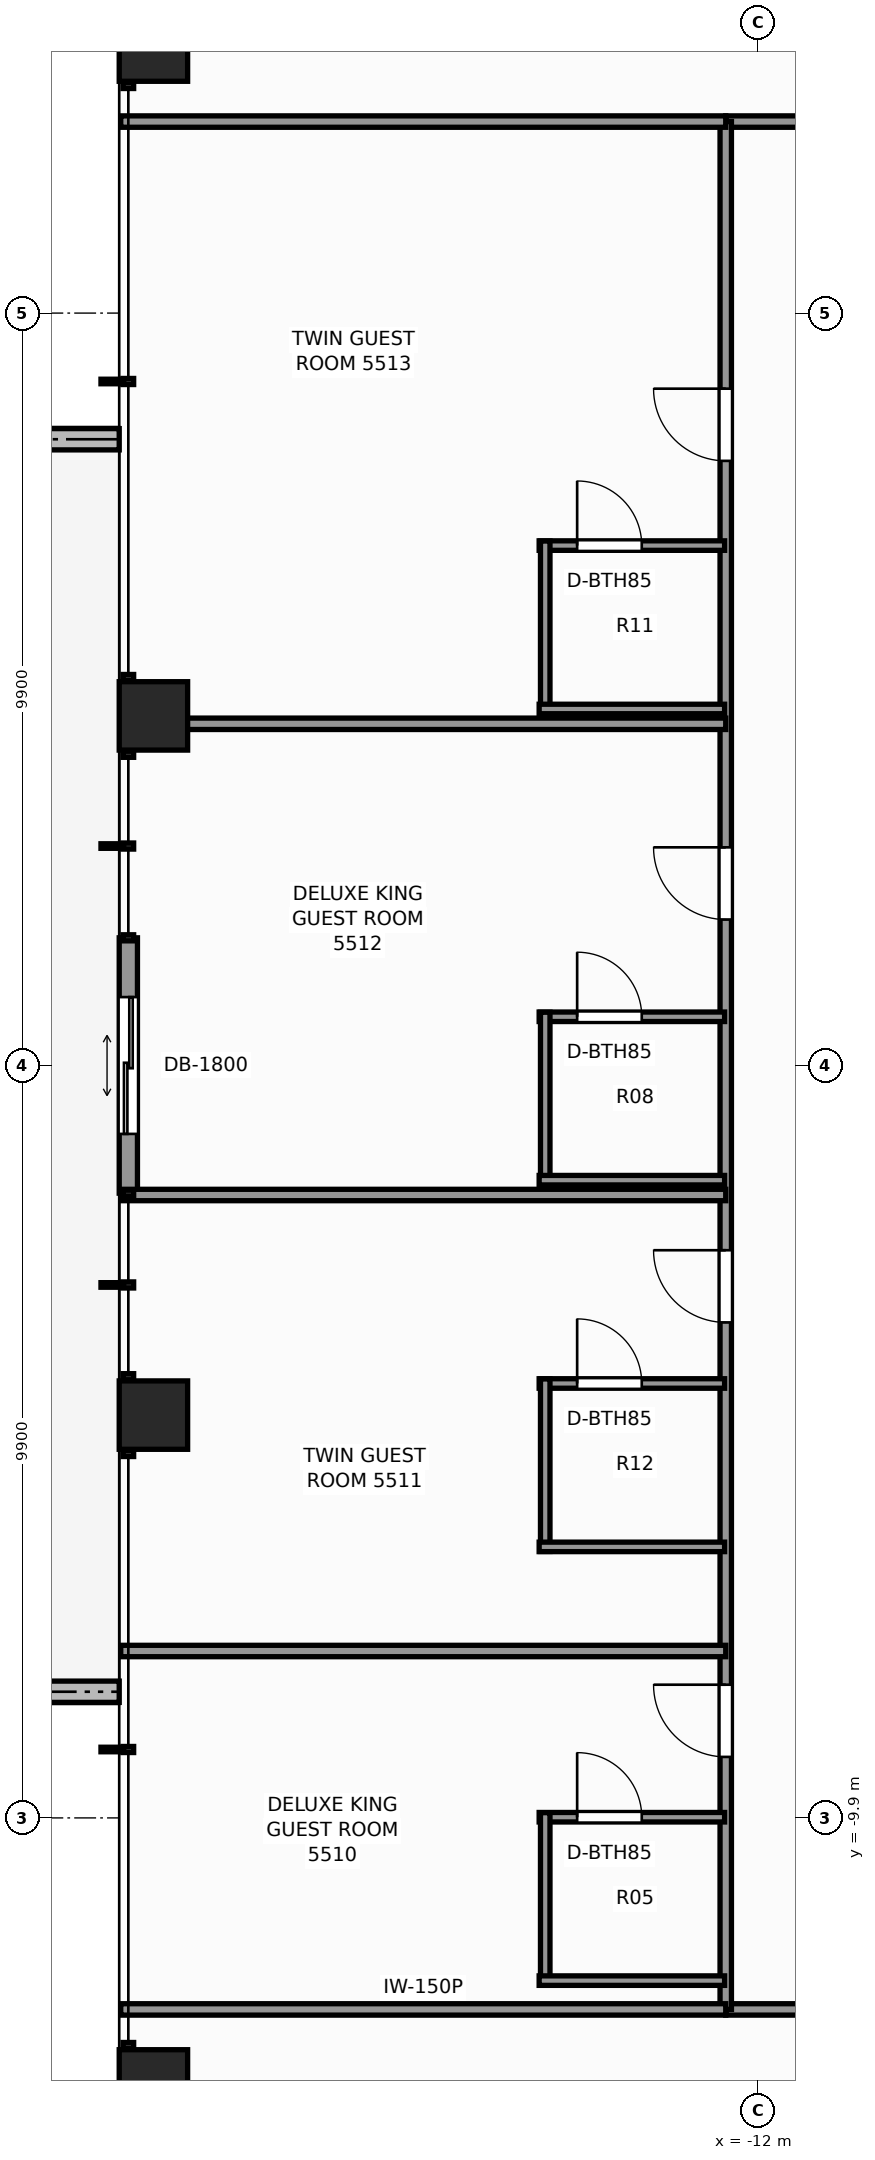
"""IFC4 building model, lengths in metres.
Left out: names, types, materials, properties, quantities, classifications, styles, units other than length and angle.
Written with IfcOpenShell. Run it as: python <this file> out.ifc"""

import sys

from ifc_helpers import new_model, si_unit, direction, frame, frame_2d, origin, origin_2d, place, context, subcontext, project, spatial, rectangle, extrude, element, fill, save


model = new_model("IFC4")
c1 = context("Model", 3, precision=1e-05, world=origin(), true_north=direction((0.0, 1.0)))
c2 = subcontext(c1, "Body", "Model", "MODEL_VIEW")
j1 = project(units=[si_unit("LENGTHUNIT", "METRE"), si_unit("PLANEANGLEUNIT", "RADIAN")], contexts=[c1])
p1 = place(None, origin())
s1 = spatial("IfcSite", under=j1, at=p1, CompositionType="ELEMENT")
p2 = place(p1, origin())
s2 = spatial("IfcBuilding", under=s1, at=p2, CompositionType="ELEMENT")
p3 = place(p2, frame((0.0, 0.0, 189.9)))
s3 = spatial("IfcBuildingStorey", under=s2, at=p3, CompositionType="ELEMENT", Elevation=189.9)
for number, where, z_axis, x_axis in (
    (1, (-19.95, -13.4, 0.0), (0.0, 0.0, 1.0), (1.0, 0.0, 0.0)),
    (2, (-19.95, -4.6, 0.0), (0.0, 0.0, 1.0), (1.0, 0.0, 0.0)),
    (3, (-19.95, 4.6, 0.0), (0.0, 0.0, 1.0), (1.0, 0.0, 0.0)),
    (4, (-19.95, 13.4, 0.0), (0.0, 0.0, 1.0), (1.0, 0.0, 0.0)),
):
    element("IfcColumn", number, at=place(p3, frame(where, z_axis=z_axis, x_axis=x_axis)), inside=s3, PredefinedType="COLUMN", context=c2, shape_type="SweptSolid", body=[
        extrude(rectangle(XDim=0.9, YDim=0.9, at=origin_2d()), origin(), (0.0, 0.0, 1.0), 3.3),
    ])
p4 = place(p3, frame((-21.66, -8.24, -0.04), z_axis=(0.0, 0.0, 1.0), x_axis=(1.0, 0.0, 0.0)))
e5 = element("IfcWall", 5, at=p4, inside=s3, PredefinedType="PARAPET", context=c2, shape_type="SweptSolid", body=[
    extrude(rectangle(XDim=1.26, YDim=0.28, at=frame_2d((0.63, 0.0))), origin(), (0.0, 0.0, 1.0), 0.42),
])
p5 = place(p3, frame((-20.4, 8.24, -0.04), z_axis=(0.0, 0.0, 1.0), x_axis=(-1.0, 0.0, 0.0)))
e6 = element("IfcWall", 6, at=p5, inside=s3, PredefinedType="PARAPET", context=c2, shape_type="SweptSolid", body=[
    extrude(rectangle(XDim=2.006, YDim=0.28, at=frame_2d((1.003, 0.0))), origin(), (0.0, 0.0, 1.0), 0.42),
])
p6 = place(p3, frame((-20.28, -1.68, 0.0), z_axis=(0.0, 0.0, 1.0), x_axis=(0.0, 1.0, 0.0)))
e7 = element("IfcWall", 7, at=p6, inside=s3, PredefinedType="STANDARD", context=c2, shape_type="SweptSolid", body=[
    extrude(rectangle(XDim=3.36, YDim=0.24, at=frame_2d((1.68, 0.0))), origin(), (0.0, 0.0, 1.0), 3.08),
])
p7 = place(p6, frame((0.78, 0.0, 0.0)))
e8 = element("IfcOpeningElement", 8, at=p7, cuts=e7, PredefinedType="OPENING", context=c2, shape_type="SweptSolid", body=[
    extrude(rectangle(XDim=1.8, YDim=2.2, at=frame_2d((0.9, 1.1))), frame((0.0, 0.13, 0.0), z_axis=(0.0, -1.0, 0.0), x_axis=(1.0, 0.0, 0.0)), (0.0, 0.0, 1.0), 0.26),
])
p8 = place(p3, frame((-12.42, -12.42, 0.0), z_axis=(0.0, 0.0, 1.0), x_axis=(1.0, 0.0, 0.0)))
e9 = element("IfcWall", 9, at=p8, inside=s3, PredefinedType="PARTITIONING", context=c2, shape_type="SweptSolid", body=[
    extrude(rectangle(XDim=25.0, YDim=0.15, at=frame_2d((12.5, 0.0))), origin(), (0.0, 0.0, 1.0), 2.369),
])
p9 = place(p8, frame((1.633, 0.0, 0.0)))
e10 = element("IfcOpeningElement", 10, at=p9, cuts=e9, PredefinedType="OPENING", context=c2, shape_type="SweptSolid", body=[
    extrude(rectangle(XDim=0.9, YDim=2.06, at=frame_2d((0.45, 1.03))), frame((0.0, 0.085, 0.0), z_axis=(0.0, -1.0, 0.0), x_axis=(1.0, 0.0, 0.0)), (0.0, 0.0, 1.0), 0.17),
])
p10 = place(p8, frame((5.113, 0.0, 0.0)))
e11 = element("IfcOpeningElement", 11, at=p10, cuts=e9, PredefinedType="OPENING", context=c2, shape_type="SweptSolid", body=[
    extrude(rectangle(XDim=0.9, YDim=2.06, at=frame_2d((0.45, 1.03))), frame((0.0, 0.085, 0.0), z_axis=(0.0, -1.0, 0.0), x_axis=(1.0, 0.0, 0.0)), (0.0, 0.0, 1.0), 0.17),
])
p11 = place(p8, frame((8.892, 0.0, 0.0)))
e12 = element("IfcOpeningElement", 12, at=p11, cuts=e9, PredefinedType="OPENING", context=c2, shape_type="SweptSolid", body=[
    extrude(rectangle(XDim=0.9, YDim=2.06, at=frame_2d((0.45, 1.03))), frame((0.0, 0.085, 0.0), z_axis=(0.0, -1.0, 0.0), x_axis=(1.0, 0.0, 0.0)), (0.0, 0.0, 1.0), 0.17),
])
p12 = place(p8, frame((13.097, 0.0, 0.0)))
e13 = element("IfcOpeningElement", 13, at=p12, cuts=e9, PredefinedType="OPENING", context=c2, shape_type="SweptSolid", body=[
    extrude(rectangle(XDim=0.95, YDim=2.06, at=frame_2d((0.475, 1.03))), frame((0.0, 0.085, 0.0), z_axis=(0.0, -1.0, 0.0), x_axis=(1.0, 0.0, 0.0)), (0.0, 0.0, 1.0), 0.17),
])
p13 = place(p8, frame((18.646, 0.0, 0.0)))
e14 = element("IfcOpeningElement", 14, at=p13, cuts=e9, PredefinedType="OPENING", context=c2, shape_type="SweptSolid", body=[
    extrude(rectangle(XDim=0.9, YDim=2.06, at=frame_2d((0.45, 1.03))), frame((0.0, 0.085, 0.0), z_axis=(0.0, -1.0, 0.0), x_axis=(1.0, 0.0, 0.0)), (0.0, 0.0, 1.0), 0.17),
])
p14 = place(p8, frame((20.981, 0.0, 0.0)))
e15 = element("IfcOpeningElement", 15, at=p14, cuts=e9, PredefinedType="OPENING", context=c2, shape_type="SweptSolid", body=[
    extrude(rectangle(XDim=0.9, YDim=2.06, at=frame_2d((0.45, 1.03))), frame((0.0, 0.085, 0.0), z_axis=(0.0, -1.0, 0.0), x_axis=(1.0, 0.0, 0.0)), (0.0, 0.0, 1.0), 0.17),
])
p15 = place(p3, frame((-12.42, 12.42, 0.0), z_axis=(0.0, 0.0, 1.0), x_axis=(1.0, 0.0, 0.0)))
e16 = element("IfcWall", 16, at=p15, inside=s3, PredefinedType="PARTITIONING", context=c2, shape_type="SweptSolid", body=[
    extrude(rectangle(XDim=25.0, YDim=0.15, at=frame_2d((12.5, 0.0))), origin(), (0.0, 0.0, 1.0), 2.369),
])
p16 = place(p15, frame((4.435, 0.0, 0.0)))
e17 = element("IfcOpeningElement", 17, at=p16, cuts=e16, PredefinedType="OPENING", context=c2, shape_type="SweptSolid", body=[
    extrude(rectangle(XDim=0.9, YDim=2.06, at=frame_2d((0.45, 1.03))), frame((0.0, 0.085, 0.0), z_axis=(0.0, -1.0, 0.0), x_axis=(1.0, 0.0, 0.0)), (0.0, 0.0, 1.0), 0.17),
])
p17 = place(p15, frame((13.968, 0.0, 0.0)))
e18 = element("IfcOpeningElement", 18, at=p17, cuts=e16, PredefinedType="OPENING", context=c2, shape_type="SweptSolid", body=[
    extrude(rectangle(XDim=0.95, YDim=2.06, at=frame_2d((0.475, 1.03))), frame((0.0, 0.085, 0.0), z_axis=(0.0, -1.0, 0.0), x_axis=(1.0, 0.0, 0.0)), (0.0, 0.0, 1.0), 0.17),
])
p18 = place(p15, frame((19.505, 0.0, 0.0)))
e19 = element("IfcOpeningElement", 19, at=p18, cuts=e16, PredefinedType="OPENING", context=c2, shape_type="SweptSolid", body=[
    extrude(rectangle(XDim=0.9, YDim=2.06, at=frame_2d((0.45, 1.03))), frame((0.0, 0.085, 0.0), z_axis=(0.0, -1.0, 0.0), x_axis=(1.0, 0.0, 0.0)), (0.0, 0.0, 1.0), 0.17),
])
p19 = place(p3, frame((-12.42, -12.42, 0.0), z_axis=(0.0, 0.0, 1.0), x_axis=(0.0, 1.0, 0.0)))
e20 = element("IfcWall", 20, at=p19, inside=s3, PredefinedType="PARTITIONING", context=c2, shape_type="SweptSolid", body=[
    extrude(rectangle(XDim=24.84, YDim=0.15, at=frame_2d((12.42, 0.0))), origin(), (0.0, 0.0, 1.0), 2.369),
])
p20 = place(p19, frame((3.323, 0.0, 0.0)))
e21 = element("IfcOpeningElement", 21, at=p20, cuts=e20, PredefinedType="OPENING", context=c2, shape_type="SweptSolid", body=[
    extrude(rectangle(XDim=0.95, YDim=2.06, at=frame_2d((0.475, 1.03))), frame((0.0, 0.085, 0.0), z_axis=(0.0, -1.0, 0.0), x_axis=(1.0, 0.0, 0.0)), (0.0, 0.0, 1.0), 0.17),
])
p21 = place(p19, frame((9.039, 0.0, 0.0)))
e22 = element("IfcOpeningElement", 22, at=p21, cuts=e20, PredefinedType="OPENING", context=c2, shape_type="SweptSolid", body=[
    extrude(rectangle(XDim=0.95, YDim=2.06, at=frame_2d((0.475, 1.03))), frame((0.0, 0.085, 0.0), z_axis=(0.0, -1.0, 0.0), x_axis=(1.0, 0.0, 0.0)), (0.0, 0.0, 1.0), 0.17),
])
p22 = place(p19, frame((14.341, 0.0, 0.0)))
e23 = element("IfcOpeningElement", 23, at=p22, cuts=e20, PredefinedType="OPENING", context=c2, shape_type="SweptSolid", body=[
    extrude(rectangle(XDim=0.95, YDim=2.06, at=frame_2d((0.475, 1.03))), frame((0.0, 0.085, 0.0), z_axis=(0.0, -1.0, 0.0), x_axis=(1.0, 0.0, 0.0)), (0.0, 0.0, 1.0), 0.17),
])
p23 = place(p19, frame((20.375, 0.0, 0.0)))
e24 = element("IfcOpeningElement", 24, at=p23, cuts=e20, PredefinedType="OPENING", context=c2, shape_type="SweptSolid", body=[
    extrude(rectangle(XDim=0.95, YDim=2.06, at=frame_2d((0.475, 1.03))), frame((0.0, 0.085, 0.0), z_axis=(0.0, -1.0, 0.0), x_axis=(1.0, 0.0, 0.0)), (0.0, 0.0, 1.0), 0.17),
])
for number, where, z_axis, x_axis in (
    (25, (-20.38, -12.42, 0.0), (0.0, 0.0, 1.0), (1.0, 0.0, 0.0)),
    (26, (-20.38, 12.42, 0.0), (0.0, 0.0, 1.0), (1.0, 0.0, 0.0)),
):
    element("IfcWall", number, at=place(p3, frame(where, z_axis=z_axis, x_axis=x_axis)), inside=s3, PredefinedType="PARTITIONING", context=c2, shape_type="SweptSolid", body=[
        extrude(rectangle(XDim=7.96, YDim=0.15, at=frame_2d((3.98, 0.0))), origin(), (0.0, 0.0, 1.0), 2.369),
    ])
p24 = place(p3, frame((-20.38, -7.704, 0.0), z_axis=(0.0, 0.0, 1.0), x_axis=(1.0, 0.0, 0.0)))
e27 = element("IfcWall", 27, at=p24, inside=s3, PredefinedType="PARTITIONING", context=c2, shape_type="SweptSolid", body=[
    extrude(rectangle(XDim=7.96, YDim=0.15, at=frame_2d((3.98, 0.0))), origin(), (0.0, 0.0, 1.0), 2.453),
])
p25 = place(p3, frame((-14.875, -9.891, 0.0), z_axis=(0.0, 0.0, 1.0), x_axis=(1.0, 0.0, 0.0)))
e28 = element("IfcWall", 28, at=p25, inside=s3, PredefinedType="PARTITIONING", context=c2, shape_type="SweptSolid", body=[
    extrude(rectangle(XDim=2.44, YDim=0.125, at=frame_2d((1.22, 0.0))), origin(), (0.0, 0.0, 1.0), 3.08),
])
p26 = place(p25, frame((0.5, 0.0, 0.0)))
e29 = element("IfcOpeningElement", 29, at=p26, cuts=e28, PredefinedType="OPENING", context=c2, shape_type="SweptSolid", body=[
    extrude(rectangle(XDim=0.85, YDim=2.03, at=frame_2d((0.425, 1.015))), frame((0.0, 0.073, 0.0), z_axis=(0.0, -1.0, 0.0), x_axis=(1.0, 0.0, 0.0)), (0.0, 0.0, 1.0), 0.145),
])
p27 = place(p3, frame((-14.795, -12.101, 0.0), z_axis=(0.0, 0.0, 1.0), x_axis=(0.0, 1.0, 0.0)))
e30 = element("IfcWall", 30, at=p27, inside=s3, PredefinedType="PARTITIONING", context=c2, shape_type="SweptSolid", body=[
    extrude(rectangle(XDim=2.27, YDim=0.125, at=frame_2d((1.135, 0.0))), origin(), (0.0, 0.0, 1.0), 2.369),
])
p28 = place(p3, frame((-14.875, -12.041, 0.0), z_axis=(0.0, 0.0, 1.0), x_axis=(1.0, 0.0, 0.0)))
e31 = element("IfcWall", 31, at=p28, inside=s3, PredefinedType="PARTITIONING", context=c2, shape_type="SweptSolid", body=[
    extrude(rectangle(XDim=2.44, YDim=0.125, at=frame_2d((1.22, 0.0))), origin(), (0.0, 0.0, 1.0), 3.08),
])
p29 = place(p3, frame((-20.38, -1.704, 0.0), z_axis=(0.0, 0.0, 1.0), x_axis=(1.0, 0.0, 0.0)))
e32 = element("IfcWall", 32, at=p29, inside=s3, PredefinedType="PARTITIONING", context=c2, shape_type="SweptSolid", body=[
    extrude(rectangle(XDim=7.96, YDim=0.15, at=frame_2d((3.98, 0.0))), origin(), (0.0, 0.0, 1.0), 2.453),
])
p30 = place(p3, frame((-14.875, -4.184, 0.0), z_axis=(0.0, 0.0, 1.0), x_axis=(1.0, 0.0, 0.0)))
e33 = element("IfcWall", 33, at=p30, inside=s3, PredefinedType="PARTITIONING", context=c2, shape_type="SweptSolid", body=[
    extrude(rectangle(XDim=2.44, YDim=0.125, at=frame_2d((1.22, 0.0))), origin(), (0.0, 0.0, 1.0), 3.08),
])
p31 = place(p30, frame((0.5, 0.0, 0.0)))
e34 = element("IfcOpeningElement", 34, at=p31, cuts=e33, PredefinedType="OPENING", context=c2, shape_type="SweptSolid", body=[
    extrude(rectangle(XDim=0.85, YDim=2.03, at=frame_2d((0.425, 1.015))), frame((0.0, 0.073, 0.0), z_axis=(0.0, -1.0, 0.0), x_axis=(1.0, 0.0, 0.0)), (0.0, 0.0, 1.0), 0.145),
])
p32 = place(p3, frame((-14.795, -6.394, 0.0), z_axis=(0.0, 0.0, 1.0), x_axis=(0.0, 1.0, 0.0)))
e35 = element("IfcWall", 35, at=p32, inside=s3, PredefinedType="PARTITIONING", context=c2, shape_type="SweptSolid", body=[
    extrude(rectangle(XDim=2.27, YDim=0.125, at=frame_2d((1.135, 0.0))), origin(), (0.0, 0.0, 1.0), 2.369),
])
p33 = place(p3, frame((-14.875, -6.334, 0.0), z_axis=(0.0, 0.0, 1.0), x_axis=(1.0, 0.0, 0.0)))
e36 = element("IfcWall", 36, at=p33, inside=s3, PredefinedType="PARTITIONING", context=c2, shape_type="SweptSolid", body=[
    extrude(rectangle(XDim=2.44, YDim=0.125, at=frame_2d((1.22, 0.0))), origin(), (0.0, 0.0, 1.0), 3.08),
])
p34 = place(p3, frame((-20.38, 4.496, 0.0), z_axis=(0.0, 0.0, 1.0), x_axis=(1.0, 0.0, 0.0)))
e37 = element("IfcWall", 37, at=p34, inside=s3, PredefinedType="PARTITIONING", context=c2, shape_type="SweptSolid", body=[
    extrude(rectangle(XDim=7.96, YDim=0.15, at=frame_2d((3.98, 0.0))), origin(), (0.0, 0.0, 1.0), 2.369),
])
p35 = place(p3, frame((-14.875, 0.641, 0.0), z_axis=(0.0, 0.0, 1.0), x_axis=(1.0, 0.0, 0.0)))
e38 = element("IfcWall", 38, at=p35, inside=s3, PredefinedType="PARTITIONING", context=c2, shape_type="SweptSolid", body=[
    extrude(rectangle(XDim=2.44, YDim=0.125, at=frame_2d((1.22, 0.0))), origin(), (0.0, 0.0, 1.0), 3.08),
])
p36 = place(p35, frame((0.5, 0.0, 0.0)))
e39 = element("IfcOpeningElement", 39, at=p36, cuts=e38, PredefinedType="OPENING", context=c2, shape_type="SweptSolid", body=[
    extrude(rectangle(XDim=0.85, YDim=2.03, at=frame_2d((0.425, 1.015))), frame((0.0, 0.073, 0.0), z_axis=(0.0, -1.0, 0.0), x_axis=(1.0, 0.0, 0.0)), (0.0, 0.0, 1.0), 0.145),
])
p37 = place(p3, frame((-14.795, -1.569, 0.0), z_axis=(0.0, 0.0, 1.0), x_axis=(0.0, 1.0, 0.0)))
e40 = element("IfcWall", 40, at=p37, inside=s3, PredefinedType="PARTITIONING", context=c2, shape_type="SweptSolid", body=[
    extrude(rectangle(XDim=2.27, YDim=0.125, at=frame_2d((1.135, 0.0))), origin(), (0.0, 0.0, 1.0), 2.605),
])
p38 = place(p3, frame((-14.875, -1.509, 0.0), z_axis=(0.0, 0.0, 1.0), x_axis=(1.0, 0.0, 0.0)))
e41 = element("IfcWall", 41, at=p38, inside=s3, PredefinedType="PARTITIONING", context=c2, shape_type="SweptSolid", body=[
    extrude(rectangle(XDim=2.44, YDim=0.125, at=frame_2d((1.22, 0.0))), origin(), (0.0, 0.0, 1.0), 3.08),
])
p39 = place(p3, frame((-14.875, 6.841, 0.0), z_axis=(0.0, 0.0, 1.0), x_axis=(1.0, 0.0, 0.0)))
e42 = element("IfcWall", 42, at=p39, inside=s3, PredefinedType="PARTITIONING", context=c2, shape_type="SweptSolid", body=[
    extrude(rectangle(XDim=2.44, YDim=0.125, at=frame_2d((1.22, 0.0))), origin(), (0.0, 0.0, 1.0), 3.08),
])
p40 = place(p39, frame((0.5, 0.0, 0.0)))
e43 = element("IfcOpeningElement", 43, at=p40, cuts=e42, PredefinedType="OPENING", context=c2, shape_type="SweptSolid", body=[
    extrude(rectangle(XDim=0.85, YDim=2.03, at=frame_2d((0.425, 1.015))), frame((0.0, 0.073, 0.0), z_axis=(0.0, -1.0, 0.0), x_axis=(1.0, 0.0, 0.0)), (0.0, 0.0, 1.0), 0.145),
])
p41 = place(p3, frame((-14.795, 4.631, 0.0), z_axis=(0.0, 0.0, 1.0), x_axis=(0.0, 1.0, 0.0)))
e44 = element("IfcWall", 44, at=p41, inside=s3, PredefinedType="PARTITIONING", context=c2, shape_type="SweptSolid", body=[
    extrude(rectangle(XDim=2.27, YDim=0.125, at=frame_2d((1.135, 0.0))), origin(), (0.0, 0.0, 1.0), 2.369),
])
p42 = place(p3, frame((-14.875, 4.691, 0.0), z_axis=(0.0, 0.0, 1.0), x_axis=(1.0, 0.0, 0.0)))
e45 = element("IfcWall", 45, at=p42, inside=s3, PredefinedType="PARTITIONING", context=c2, shape_type="SweptSolid", body=[
    extrude(rectangle(XDim=2.44, YDim=0.125, at=frame_2d((1.22, 0.0))), origin(), (0.0, 0.0, 1.0), 2.369),
])
p43 = place(p7, origin())
e46 = element("IfcDoor", 46, at=p43, inside=s3, OperationType="DOUBLE_DOOR_SLIDING", PredefinedType="DOOR", context=c2, shape_type="SweptSolid", body=[
    extrude(rectangle(XDim=1.8, YDim=2.2, at=frame_2d((0.9, 1.1))), frame((0.0, 0.025, 0.0), z_axis=(0.0, -1.0, 0.0), x_axis=(1.0, 0.0, 0.0)), (0.0, 0.0, 1.0), 0.05),
])
fill(e8, e46)
p44 = place(p26, origin())
e47 = element("IfcDoor", 47, at=p44, inside=s3, OperationType="SINGLE_SWING_LEFT", PredefinedType="DOOR", context=c2, shape_type="SweptSolid", body=[
    extrude(rectangle(XDim=0.85, YDim=2.03, at=frame_2d((0.425, 1.015))), frame((0.0, 0.025, 0.0), z_axis=(0.0, -1.0, 0.0), x_axis=(1.0, 0.0, 0.0)), (0.0, 0.0, 1.0), 0.05),
])
fill(e29, e47)
p45 = place(p20, origin())
e48 = element("IfcDoor", 48, at=p45, inside=s3, OperationType="SINGLE_SWING_RIGHT", PredefinedType="DOOR", context=c2, shape_type="SweptSolid", body=[
    extrude(rectangle(XDim=0.95, YDim=2.06, at=frame_2d((0.475, 1.03))), frame((0.0, 0.025, 0.0), z_axis=(0.0, -1.0, 0.0), x_axis=(1.0, 0.0, 0.0)), (0.0, 0.0, 1.0), 0.05),
])
fill(e21, e48)
p46 = place(p31, origin())
e49 = element("IfcDoor", 49, at=p46, inside=s3, OperationType="SINGLE_SWING_LEFT", PredefinedType="DOOR", context=c2, shape_type="SweptSolid", body=[
    extrude(rectangle(XDim=0.85, YDim=2.03, at=frame_2d((0.425, 1.015))), frame((0.0, 0.025, 0.0), z_axis=(0.0, -1.0, 0.0), x_axis=(1.0, 0.0, 0.0)), (0.0, 0.0, 1.0), 0.05),
])
fill(e34, e49)
p47 = place(p21, origin())
e50 = element("IfcDoor", 50, at=p47, inside=s3, OperationType="SINGLE_SWING_RIGHT", PredefinedType="DOOR", context=c2, shape_type="SweptSolid", body=[
    extrude(rectangle(XDim=0.95, YDim=2.06, at=frame_2d((0.475, 1.03))), frame((0.0, 0.025, 0.0), z_axis=(0.0, -1.0, 0.0), x_axis=(1.0, 0.0, 0.0)), (0.0, 0.0, 1.0), 0.05),
])
fill(e22, e50)
p48 = place(p36, origin())
e51 = element("IfcDoor", 51, at=p48, inside=s3, OperationType="SINGLE_SWING_LEFT", PredefinedType="DOOR", context=c2, shape_type="SweptSolid", body=[
    extrude(rectangle(XDim=0.85, YDim=2.03, at=frame_2d((0.425, 1.015))), frame((0.0, 0.025, 0.0), z_axis=(0.0, -1.0, 0.0), x_axis=(1.0, 0.0, 0.0)), (0.0, 0.0, 1.0), 0.05),
])
fill(e39, e51)
p49 = place(p22, origin())
e52 = element("IfcDoor", 52, at=p49, inside=s3, OperationType="SINGLE_SWING_RIGHT", PredefinedType="DOOR", context=c2, shape_type="SweptSolid", body=[
    extrude(rectangle(XDim=0.95, YDim=2.06, at=frame_2d((0.475, 1.03))), frame((0.0, 0.025, 0.0), z_axis=(0.0, -1.0, 0.0), x_axis=(1.0, 0.0, 0.0)), (0.0, 0.0, 1.0), 0.05),
])
fill(e23, e52)
p50 = place(p40, origin())
e53 = element("IfcDoor", 53, at=p50, inside=s3, OperationType="SINGLE_SWING_LEFT", PredefinedType="DOOR", context=c2, shape_type="SweptSolid", body=[
    extrude(rectangle(XDim=0.85, YDim=2.03, at=frame_2d((0.425, 1.015))), frame((0.0, 0.025, 0.0), z_axis=(0.0, -1.0, 0.0), x_axis=(1.0, 0.0, 0.0)), (0.0, 0.0, 1.0), 0.05),
])
fill(e43, e53)
p51 = place(p23, origin())
e54 = element("IfcDoor", 54, at=p51, inside=s3, OperationType="SINGLE_SWING_RIGHT", PredefinedType="DOOR", context=c2, shape_type="SweptSolid", body=[
    extrude(rectangle(XDim=0.95, YDim=2.06, at=frame_2d((0.475, 1.03))), frame((0.0, 0.025, 0.0), z_axis=(0.0, -1.0, 0.0), x_axis=(1.0, 0.0, 0.0)), (0.0, 0.0, 1.0), 0.05),
])
fill(e24, e54)
save(model, sys.argv[1])
